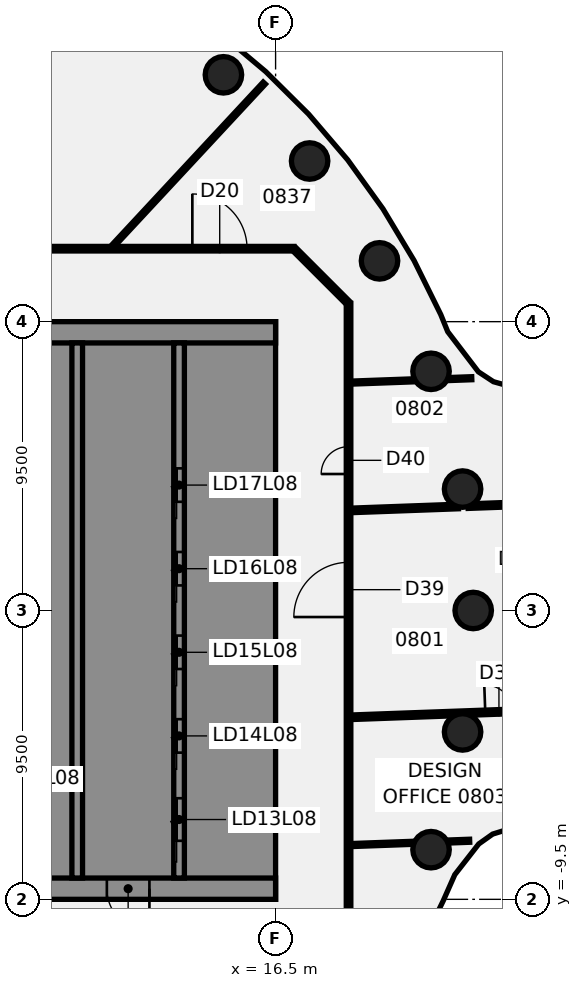
"""IFC4 building model, lengths in metres.
Left out: names, types, materials, properties, quantities, classifications, styles, units other than length and angle.
Written with IfcOpenShell. Run it as: python <this file> out.ifc"""

import sys

from ifc_helpers import new_model, si_unit, direction, frame, frame_2d, origin, origin_2d, place, context, subcontext, project, spatial, polyline, rectangle, circle, outline, extrude, element, fill, save


model = new_model("IFC4")
c1 = context("Model", 3, precision=1e-05, world=origin(), true_north=direction((0.0, 1.0)))
c2 = subcontext(c1, "Body", "Model", "MODEL_VIEW")
j1 = project(units=[si_unit("LENGTHUNIT", "METRE"), si_unit("PLANEANGLEUNIT", "RADIAN")], contexts=[c1])
p1 = place(None, origin())
s1 = spatial("IfcSite", under=j1, at=p1, CompositionType="ELEMENT")
p2 = place(p1, origin())
s2 = spatial("IfcBuilding", under=s1, at=p2, CompositionType="ELEMENT")
p3 = place(p2, frame((0.0, 0.0, 41.5)))
s3 = spatial("IfcBuildingStorey", under=s2, at=p3, CompositionType="ELEMENT", Elevation=41.5)
for number, where, z_axis, x_axis in (
    (1, (23.0, 0.0, -0.14), (0.0, 0.0, 1.0), (1.0, 0.0, 0.0)),
    (2, (22.651, 3.994, -0.14), (0.0, 0.0, 1.0), (1.0, 0.0, 0.0)),
    (3, (21.613, 7.866, -0.14), (0.0, 0.0, 1.0), (1.0, 0.0, 0.0)),
    (4, (19.919, 11.5, -0.14), (0.0, 0.0, 1.0), (1.0, 0.0, 0.0)),
    (5, (17.619, 14.784, -0.14), (0.0, 0.0, 1.0), (1.0, 0.0, 0.0)),
    (6, (14.784, 17.619, -0.14), (0.0, 0.0, 1.0), (1.0, 0.0, 0.0)),
    (7, (21.613, -7.866, -0.14), (0.0, 0.0, 1.0), (1.0, 0.0, 0.0)),
    (8, (22.651, -3.994, -0.14), (0.0, 0.0, 1.0), (1.0, 0.0, 0.0)),
):
    element("IfcColumn", number, at=place(p3, frame(where, z_axis=z_axis, x_axis=x_axis)), inside=s3, PredefinedType="COLUMN", context=c2, shape_type="SweptSolid", body=[
        extrude(circle(Radius=0.6, at=origin_2d()), origin(), (0.0, 0.0, 1.0), 3.75),
    ])
p4 = place(p3, frame((17.128, 11.872, 0.0), z_axis=(0.0, 0.0, 1.0), x_axis=(0.707106781187, -0.707106781187, 0.0)))
e9 = element("IfcWall", 9, at=p4, inside=s3, PredefinedType="PARTITIONING", context=c2, shape_type="SweptSolid", body=[
    extrude(rectangle(XDim=2.465, YDim=0.15, at=frame_2d((1.232, 0.0))), origin(), (0.0, 0.0, 1.0), 3.01),
])
p5 = place(p3, frame((-17.065, 11.9, 0.0), z_axis=(0.0, 0.0, 1.0), x_axis=(1.0, 0.0, 0.0)))
e10 = element("IfcWall", 10, at=p5, inside=s3, PredefinedType="PARTITIONING", context=c2, shape_type="SweptSolid", body=[
    extrude(rectangle(XDim=34.165, YDim=0.15, at=frame_2d((17.083, 0.0))), origin(), (0.0, 0.0, 1.0), 3.01),
])
p6 = place(p5, frame((16.581, 0.0, 0.0)))
e11 = element("IfcOpeningElement", 11, at=p6, cuts=e10, PredefinedType="OPENING", context=c2, shape_type="SweptSolid", body=[
    extrude(rectangle(XDim=1.8, YDim=2.1, at=frame_2d((0.9, 1.05))), frame((0.0, 0.085, 0.0), z_axis=(0.0, -1.0, 0.0), x_axis=(1.0, 0.0, 0.0)), (0.0, 0.0, 1.0), 0.17),
])
p7 = place(p5, frame((30.827, 0.0, 0.0)))
e12 = element("IfcOpeningElement", 12, at=p7, cuts=e10, PredefinedType="OPENING", context=c2, shape_type="SweptSolid", body=[
    extrude(rectangle(XDim=1.8, YDim=2.1, at=frame_2d((0.9, 1.05))), frame((0.0, 0.085, 0.0), z_axis=(0.0, -1.0, 0.0), x_axis=(1.0, 0.0, 0.0)), (0.0, 0.0, 1.0), 0.17),
])
p8 = place(p5, frame((5.614, 0.0, 0.0)))
e13 = element("IfcOpeningElement", 13, at=p8, cuts=e10, PredefinedType="OPENING", context=c2, shape_type="SweptSolid", body=[
    extrude(rectangle(XDim=1.8, YDim=2.1, at=frame_2d((0.9, 1.05))), frame((0.0, 0.085, 0.0), z_axis=(0.0, -1.0, 0.0), x_axis=(1.0, 0.0, 0.0)), (0.0, 0.0, 1.0), 0.17),
])
p9 = place(p3, frame((18.96, -3.513, 0.0), z_axis=(0.0, 0.0, 1.0), x_axis=(0.999336787345, 0.036414083241, 0.0)))
e14 = element("IfcWall", 14, at=p9, inside=s3, PredefinedType="PARTITIONING", context=c2, shape_type="SweptSolid", body=[
    extrude(rectangle(XDim=6.906, YDim=0.15, at=frame_2d((3.453, 0.0))), origin(), (0.0, 0.0, 1.0), 3.01),
])
p10 = place(p9, frame((4.44, 0.0, 0.0)))
e15 = element("IfcOpeningElement", 15, at=p10, cuts=e14, PredefinedType="OPENING", context=c2, shape_type="SweptSolid", body=[
    extrude(rectangle(XDim=0.9, YDim=2.1, at=frame_2d((0.45, 1.05))), frame((0.0, 0.085, 0.0), z_axis=(0.0, -1.0, 0.0), x_axis=(1.0, 0.0, 0.0)), (0.0, 0.0, 1.0), 0.17),
])
p11 = place(p3, frame((18.96, 3.291, 0.0), z_axis=(0.0, 0.0, 1.0), x_axis=(0.999337592386, 0.036391983232, 0.0)))
e16 = element("IfcWall", 16, at=p11, inside=s3, PredefinedType="PARTITIONING", context=c2, shape_type="SweptSolid", body=[
    extrude(rectangle(XDim=3.556, YDim=0.15, at=frame_2d((1.778, 0.0))), origin(), (0.0, 0.0, 1.0), 3.01),
])
p12 = place(p3, frame((22.831, 3.432, 0.0), z_axis=(0.0, 0.0, 1.0), x_axis=(0.999335373661, 0.036452859284, 0.0)))
e17 = element("IfcWall", 17, at=p12, inside=s3, PredefinedType="PARTITIONING", context=c2, shape_type="SweptSolid", body=[
    extrude(rectangle(XDim=2.78, YDim=0.15, at=frame_2d((1.39, 0.0))), origin(), (0.0, 0.0, 1.0), 3.01),
])
p13 = place(p3, frame((18.96, 7.494, 0.0), z_axis=(0.0, 0.0, 1.0), x_axis=(0.999331272878, 0.036565106981, 0.0)))
e18 = element("IfcWall", 18, at=p13, inside=s3, PredefinedType="PARTITIONING", context=c2, shape_type="SweptSolid", body=[
    extrude(rectangle(XDim=2.123, YDim=0.1, at=frame_2d((1.062, 0.0))), origin(), (0.0, 0.0, 1.0), 3.01),
])
p14 = place(p3, frame((22.154, 7.611, 0.0), z_axis=(0.0, 0.0, 1.0), x_axis=(0.999338892628, 0.036356260539, 0.0)))
e19 = element("IfcWall", 19, at=p14, inside=s3, PredefinedType="PARTITIONING", context=c2, shape_type="SweptSolid", body=[
    extrude(rectangle(XDim=0.799, YDim=0.1, at=frame_2d((0.399, 0.0))), origin(), (0.0, 0.0, 1.0), 3.01),
])
p15 = place(p3, frame((18.96, -7.716, 0.0), z_axis=(0.0, 0.0, 1.0), x_axis=(0.999340952075, 0.03629960752, 0.0)))
e20 = element("IfcWall", 20, at=p15, inside=s3, PredefinedType="PARTITIONING", context=c2, shape_type="SweptSolid", body=[
    extrude(rectangle(XDim=2.105, YDim=0.1, at=frame_2d((1.053, 0.0))), origin(), (0.0, 0.0, 1.0), 3.01),
])
p16 = place(p3, frame((22.151, -7.6, 0.0), z_axis=(0.0, 0.0, 1.0), x_axis=(0.999340597236, 0.036309375033, 0.0)))
e21 = element("IfcWall", 21, at=p16, inside=s3, PredefinedType="PARTITIONING", context=c2, shape_type="SweptSolid", body=[
    extrude(rectangle(XDim=0.733, YDim=0.1, at=frame_2d((0.366, 0.0))), origin(), (0.0, 0.0, 1.0), 3.01),
])
p17 = place(p3, frame((11.149, 11.99, 0.0), z_axis=(0.0, 0.0, 1.0), x_axis=(0.680920818634, 0.732357043218, 0.0)))
e22 = element("IfcWall", 22, at=p17, inside=s3, PredefinedType="PARTITIONING", context=c2, shape_type="SweptSolid", body=[
    extrude(rectangle(XDim=7.314, YDim=0.1, at=frame_2d((3.657, 0.0))), origin(), (0.0, 0.0, 1.0), 3.01),
])
p18 = place(p3, frame((18.9, -10.1, 0.0), z_axis=(0.0, 0.0, 1.0), x_axis=(0.0, 1.0, 0.0)))
e23 = element("IfcWall", 23, at=p18, inside=s3, PredefinedType="PARTITIONING", context=c2, shape_type="SweptSolid", body=[
    extrude(rectangle(XDim=20.2, YDim=0.15, at=frame_2d((10.1, 0.0))), origin(), (0.0, 0.0, 1.0), 3.01),
])
p19 = place(p18, frame((9.885, 0.0, 0.0)))
e24 = element("IfcOpeningElement", 24, at=p19, cuts=e23, PredefinedType="OPENING", context=c2, shape_type="SweptSolid", body=[
    extrude(rectangle(XDim=1.8, YDim=2.1, at=frame_2d((0.9, 1.05))), frame((0.0, 0.085, 0.0), z_axis=(0.0, -1.0, 0.0), x_axis=(1.0, 0.0, 0.0)), (0.0, 0.0, 1.0), 0.17),
])
p20 = place(p18, frame((14.589, 0.0, 0.0)))
e25 = element("IfcOpeningElement", 25, at=p20, cuts=e23, PredefinedType="OPENING", context=c2, shape_type="SweptSolid", body=[
    extrude(rectangle(XDim=0.9, YDim=2.1, at=frame_2d((0.45, 1.05))), frame((0.0, 0.085, 0.0), z_axis=(0.0, -1.0, 0.0), x_axis=(1.0, 0.0, 0.0)), (0.0, 0.0, 1.0), 0.17),
])
p21 = place(p3, frame((16.5, -9.15, 0.0), z_axis=(0.0, 0.0, 1.0), x_axis=(-1.0, 0.0, 0.0)))
e26 = element("IfcWall", 26, at=p21, inside=s3, PredefinedType="SHEAR", context=c2, shape_type="SweptSolid", body=[
    extrude(rectangle(XDim=13.0, YDim=0.7, at=frame_2d((6.5, 0.0))), origin(), (0.0, 0.0, 1.0), 3.61),
])
p22 = place(p21, frame((4.15, 0.0, 0.0)))
e27 = element("IfcOpeningElement", 27, at=p22, cuts=e26, PredefinedType="OPENING", context=c2, shape_type="SweptSolid", body=[
    extrude(rectangle(XDim=1.4, YDim=2.1, at=frame_2d((0.7, 1.05))), frame((0.0, 0.36, 0.0), z_axis=(0.0, -1.0, 0.0), x_axis=(1.0, 0.0, 0.0)), (0.0, 0.0, 1.0), 0.72),
])
p23 = place(p21, frame((10.125, 0.0, 0.0)))
e28 = element("IfcOpeningElement", 28, at=p23, cuts=e26, PredefinedType="OPENING", context=c2, shape_type="SweptSolid", body=[
    extrude(rectangle(XDim=1.4, YDim=2.1, at=frame_2d((0.7, 1.05))), frame((0.0, 0.36, 0.0), z_axis=(0.0, -1.0, 0.0), x_axis=(1.0, 0.0, 0.0)), (0.0, 0.0, 1.0), 0.72),
])
p24 = place(p3, origin())
e29 = element("IfcWall", 29, at=p24, inside=s3, PredefinedType="SHEAR", context=c2, shape_type="SweptSolid", body=[
    extrude(outline(polyline([(13.5, -8.8), (15.8, -8.8), (16.5, -8.8), (16.5, 8.8), (15.8, 8.8), (13.5, 8.8), (13.5, 8.125), (15.8, 8.125), (15.8, 5.625), (13.5, 5.625), (13.5, 5.375), (15.8, 5.375), (15.8, 2.875), (13.5, 2.875), (13.5, 2.625), (15.8, 2.625), (15.8, 0.125), (13.5, 0.125), (13.5, -0.125), (15.8, -0.125), (15.8, -2.625), (13.5, -2.625), (13.5, -2.875), (15.8, -2.875), (15.8, -5.375), (13.5, -5.375), (13.5, -5.625), (15.8, -5.625), (15.8, -8.125), (13.5, -8.125), (13.5, -8.8)])), origin(), (0.0, 0.0, 1.0), 3.61),
])
p25 = place(p3, frame((16.5, 9.15, 0.0), z_axis=(0.0, 0.0, 1.0), x_axis=(-1.0, 0.0, 0.0)))
e30 = element("IfcWall", 30, at=p25, inside=s3, PredefinedType="SHEAR", context=c2, shape_type="SweptSolid", body=[
    extrude(rectangle(XDim=13.0, YDim=0.7, at=frame_2d((6.5, 0.0))), origin(), (0.0, 0.0, 1.0), 3.61),
])
p26 = place(p3, origin())
e31 = element("IfcWall", 31, at=p26, inside=s3, PredefinedType="SHEAR", context=c2, shape_type="SweptSolid", body=[
    extrude(outline(polyline([(9.8, -5.375), (7.5, -5.375), (7.5, -2.875), (9.8, -2.875), (9.8, -2.625), (7.5, -2.625), (7.5, -0.125), (9.8, -0.125), (9.8, 0.125), (7.5, 0.125), (7.5, 2.625), (9.8, 2.625), (9.8, 2.875), (7.5, 2.875), (7.5, 5.375), (9.8, 5.375), (9.8, 5.625), (7.5, 5.625), (7.5, 8.125), (9.8, 8.125), (9.8, 8.8), (7.5, 8.8), (7.15, 8.8), (7.15, -5.625), (7.5, -5.625), (9.8, -5.625), (9.8, -5.375)])), origin(), (0.0, 0.0, 1.0), 3.61),
])
p27 = place(p3, origin())
e32 = element("IfcWall", 32, at=p27, inside=s3, PredefinedType="SHEAR", context=c2, shape_type="SweptSolid", body=[
    extrude(outline(polyline([(7.5, -8.125), (7.5, -8.8), (9.8, -8.8), (9.8, -8.125), (9.8, -5.625), (9.55, -5.625), (9.55, -8.125), (7.5, -8.125)])), origin(), (0.0, 0.0, 1.0), 3.61),
])
p28 = place(p3, frame((13.325, -8.8, 0.0), z_axis=(0.0, 0.0, 1.0), x_axis=(0.0, 1.0, 0.0)))
e33 = element("IfcWall", 33, at=p28, inside=s3, PredefinedType="SHEAR", context=c2, shape_type="SweptSolid", body=[
    extrude(rectangle(XDim=17.6, YDim=0.35, at=frame_2d((8.8, 0.0))), origin(), (0.0, 0.0, 1.0), 3.61),
])
p29 = place(p28, frame((1.225, 0.0, 0.0)))
e34 = element("IfcOpeningElement", 34, at=p29, cuts=e33, PredefinedType="OPENING", context=c2, shape_type="SweptSolid", body=[
    extrude(rectangle(XDim=1.4, YDim=2.1, at=frame_2d((0.7, 1.05))), frame((0.0, 0.185, 0.0), z_axis=(0.0, -1.0, 0.0), x_axis=(1.0, 0.0, 0.0)), (0.0, 0.0, 1.0), 0.37),
])
p30 = place(p28, frame((4.125, 0.0, 0.0)))
e35 = element("IfcOpeningElement", 35, at=p30, cuts=e33, PredefinedType="OPENING", context=c2, shape_type="SweptSolid", body=[
    extrude(rectangle(XDim=1.1, YDim=2.1, at=frame_2d((0.55, 1.05))), frame((0.0, 0.185, 0.0), z_axis=(0.0, -1.0, 0.0), x_axis=(1.0, 0.0, 0.0)), (0.0, 0.0, 1.0), 0.37),
])
p31 = place(p28, frame((6.875, 0.0, 0.0)))
e36 = element("IfcOpeningElement", 36, at=p31, cuts=e33, PredefinedType="OPENING", context=c2, shape_type="SweptSolid", body=[
    extrude(rectangle(XDim=1.1, YDim=2.1, at=frame_2d((0.55, 1.05))), frame((0.0, 0.185, 0.0), z_axis=(0.0, -1.0, 0.0), x_axis=(1.0, 0.0, 0.0)), (0.0, 0.0, 1.0), 0.37),
])
p32 = place(p28, frame((9.625, 0.0, 0.0)))
e37 = element("IfcOpeningElement", 37, at=p32, cuts=e33, PredefinedType="OPENING", context=c2, shape_type="SweptSolid", body=[
    extrude(rectangle(XDim=1.1, YDim=2.1, at=frame_2d((0.55, 1.05))), frame((0.0, 0.185, 0.0), z_axis=(0.0, -1.0, 0.0), x_axis=(1.0, 0.0, 0.0)), (0.0, 0.0, 1.0), 0.37),
])
p33 = place(p28, frame((12.375, 0.0, 0.0)))
e38 = element("IfcOpeningElement", 38, at=p33, cuts=e33, PredefinedType="OPENING", context=c2, shape_type="SweptSolid", body=[
    extrude(rectangle(XDim=1.1, YDim=2.1, at=frame_2d((0.55, 1.05))), frame((0.0, 0.185, 0.0), z_axis=(0.0, -1.0, 0.0), x_axis=(1.0, 0.0, 0.0)), (0.0, 0.0, 1.0), 0.37),
])
p34 = place(p3, frame((9.975, -8.8, 0.0), z_axis=(0.0, 0.0, 1.0), x_axis=(0.0, 1.0, 0.0)))
e39 = element("IfcWall", 39, at=p34, inside=s3, PredefinedType="SHEAR", context=c2, shape_type="SweptSolid", body=[
    extrude(rectangle(XDim=17.6, YDim=0.35, at=frame_2d((8.8, 0.0))), origin(), (0.0, 0.0, 1.0), 3.61),
])
p35 = place(p7, origin())
e40 = element("IfcDoor", 40, at=p35, inside=s3, OperationType="DOUBLE_DOOR_SINGLE_SWING", PredefinedType="DOOR", context=c2, shape_type="SweptSolid", body=[
    extrude(rectangle(XDim=1.8, YDim=2.1, at=frame_2d((0.9, 1.05))), frame((0.0, 0.025, 0.0), z_axis=(0.0, -1.0, 0.0), x_axis=(1.0, 0.0, 0.0)), (0.0, 0.0, 1.0), 0.05),
])
fill(e12, e40)
p36 = place(p10, frame((0.9, 0.0, 0.0), z_axis=(0.0, 0.0, 1.0), x_axis=(-1.0, 0.0, 0.0)))
e41 = element("IfcDoor", 41, at=p36, inside=s3, OperationType="SINGLE_SWING_RIGHT", PredefinedType="DOOR", context=c2, shape_type="SweptSolid", body=[
    extrude(rectangle(XDim=0.9, YDim=2.1, at=frame_2d((0.45, 1.05))), frame((0.0, 0.025, 0.0), z_axis=(0.0, -1.0, 0.0), x_axis=(1.0, 0.0, 0.0)), (0.0, 0.0, 1.0), 0.05),
])
fill(e15, e41)
p37 = place(p19, origin())
e42 = element("IfcDoor", 42, at=p37, inside=s3, OperationType="DOUBLE_DOOR_SINGLE_SWING", PredefinedType="DOOR", context=c2, shape_type="SweptSolid", body=[
    extrude(rectangle(XDim=1.8, YDim=2.1, at=frame_2d((0.9, 1.05))), frame((0.0, 0.025, 0.0), z_axis=(0.0, -1.0, 0.0), x_axis=(1.0, 0.0, 0.0)), (0.0, 0.0, 1.0), 0.05),
])
fill(e24, e42)
p38 = place(p20, frame((0.9, 0.0, 0.0), z_axis=(0.0, 0.0, 1.0), x_axis=(-1.0, 0.0, 0.0)))
e43 = element("IfcDoor", 43, at=p38, inside=s3, OperationType="SINGLE_SWING_RIGHT", PredefinedType="DOOR", context=c2, shape_type="SweptSolid", body=[
    extrude(rectangle(XDim=0.9, YDim=2.1, at=frame_2d((0.45, 1.05))), frame((0.0, 0.025, 0.0), z_axis=(0.0, -1.0, 0.0), x_axis=(1.0, 0.0, 0.0)), (0.0, 0.0, 1.0), 0.05),
])
fill(e25, e43)
p39 = place(p22, origin())
e44 = element("IfcDoor", 44, at=p39, inside=s3, OperationType="SINGLE_SWING_LEFT", PredefinedType="DOOR", context=c2, shape_type="SweptSolid", body=[
    extrude(rectangle(XDim=1.4, YDim=2.1, at=frame_2d((0.7, 1.05))), frame((0.0, 0.025, 0.0), z_axis=(0.0, -1.0, 0.0), x_axis=(1.0, 0.0, 0.0)), (0.0, 0.0, 1.0), 0.05),
])
fill(e27, e44)
p40 = place(p29, origin())
e45 = element("IfcDoor", 45, at=p40, inside=s3, OperationType="SLIDING_TO_LEFT", PredefinedType="DOOR", context=c2, shape_type="SweptSolid", body=[
    extrude(rectangle(XDim=1.4, YDim=2.1, at=frame_2d((0.7, 1.05))), frame((0.0, 0.025, 0.0), z_axis=(0.0, -1.0, 0.0), x_axis=(1.0, 0.0, 0.0)), (0.0, 0.0, 1.0), 0.05),
])
fill(e34, e45)
p41 = place(p30, origin())
e46 = element("IfcDoor", 46, at=p41, inside=s3, OperationType="SLIDING_TO_LEFT", PredefinedType="DOOR", context=c2, shape_type="SweptSolid", body=[
    extrude(rectangle(XDim=1.1, YDim=2.1, at=frame_2d((0.55, 1.05))), frame((0.0, 0.025, 0.0), z_axis=(0.0, -1.0, 0.0), x_axis=(1.0, 0.0, 0.0)), (0.0, 0.0, 1.0), 0.05),
])
fill(e35, e46)
p42 = place(p31, origin())
e47 = element("IfcDoor", 47, at=p42, inside=s3, OperationType="SLIDING_TO_LEFT", PredefinedType="DOOR", context=c2, shape_type="SweptSolid", body=[
    extrude(rectangle(XDim=1.1, YDim=2.1, at=frame_2d((0.55, 1.05))), frame((0.0, 0.025, 0.0), z_axis=(0.0, -1.0, 0.0), x_axis=(1.0, 0.0, 0.0)), (0.0, 0.0, 1.0), 0.05),
])
fill(e36, e47)
p43 = place(p32, origin())
e48 = element("IfcDoor", 48, at=p43, inside=s3, OperationType="SLIDING_TO_LEFT", PredefinedType="DOOR", context=c2, shape_type="SweptSolid", body=[
    extrude(rectangle(XDim=1.1, YDim=2.1, at=frame_2d((0.55, 1.05))), frame((0.0, 0.025, 0.0), z_axis=(0.0, -1.0, 0.0), x_axis=(1.0, 0.0, 0.0)), (0.0, 0.0, 1.0), 0.05),
])
fill(e37, e48)
p44 = place(p33, origin())
e49 = element("IfcDoor", 49, at=p44, inside=s3, OperationType="SLIDING_TO_LEFT", PredefinedType="DOOR", context=c2, shape_type="SweptSolid", body=[
    extrude(rectangle(XDim=1.1, YDim=2.1, at=frame_2d((0.55, 1.05))), frame((0.0, 0.025, 0.0), z_axis=(0.0, -1.0, 0.0), x_axis=(1.0, 0.0, 0.0)), (0.0, 0.0, 1.0), 0.05),
])
fill(e38, e49)
save(model, sys.argv[1])
